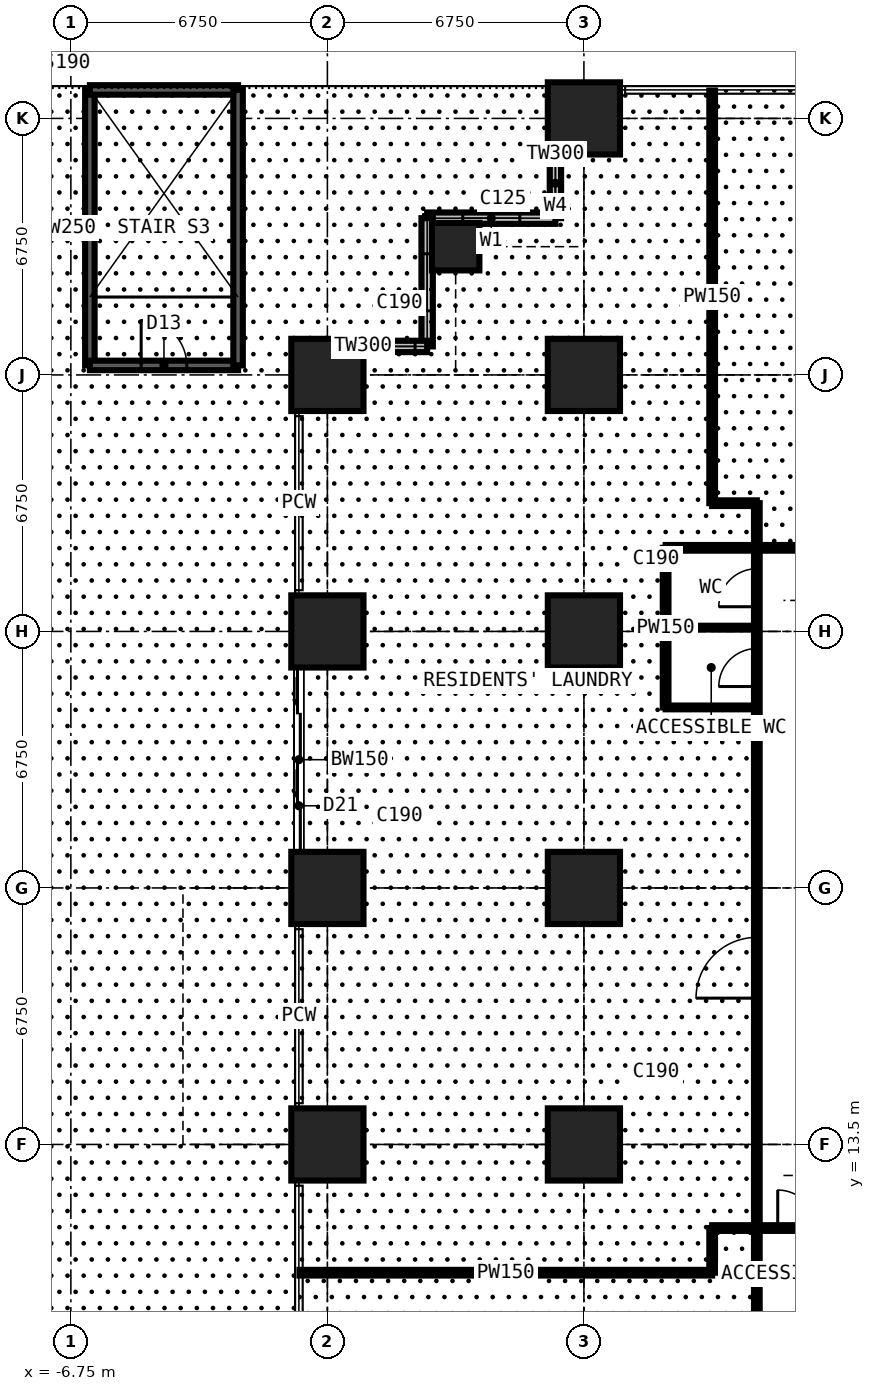
"""IFC4 building model, lengths in metres.
Left out: names, types, materials, properties, quantities, classifications, styles, units other than length and angle.
Written with IfcOpenShell. Run it as: python <this file> out.ifc"""

import sys

from ifc_helpers import new_model, si_unit, direction, frame, frame_2d, origin, origin_2d, place, context, subcontext, project, spatial, rectangle, extrude, element, fill, save


model = new_model("IFC4")
c1 = context("Model", 3, precision=1e-05, world=origin(), true_north=direction((0.0, 1.0)))
c2 = subcontext(c1, "Body", "Model", "MODEL_VIEW")
j1 = project(units=[si_unit("LENGTHUNIT", "METRE"), si_unit("PLANEANGLEUNIT", "RADIAN")], contexts=[c1])
p1 = place(None, origin())
s1 = spatial("IfcSite", under=j1, at=p1, CompositionType="ELEMENT")
p2 = place(p1, origin())
s2 = spatial("IfcBuilding", under=s1, at=p2, CompositionType="ELEMENT")
p3 = place(p2, frame((0.0, 0.0, 13.5)))
s3 = spatial("IfcBuildingStorey", under=s2, at=p3, CompositionType="ELEMENT", Elevation=13.5)
for number, where, z_axis, x_axis in (
    (1, (0.0, 13.5, 0.0), (0.0, 0.0, 1.0), (1.0, 0.0, 0.0)),
    (2, (0.0, 20.25, 0.0), (0.0, 0.0, 1.0), (1.0, 0.0, 0.0)),
    (3, (0.0, 27.0, 0.0), (0.0, 0.0, 1.0), (1.0, 0.0, 0.0)),
    (4, (0.0, 33.75, 0.0), (0.0, 0.0, 1.0), (1.0, 0.0, 0.0)),
):
    element("IfcColumn", number, at=place(p3, frame(where, z_axis=z_axis, x_axis=x_axis)), inside=s3, PredefinedType="COLUMN", context=c2, shape_type="SweptSolid", body=[
        extrude(rectangle(XDim=1.9, YDim=1.9, at=origin_2d()), origin(), (0.0, 0.0, 1.0), 4.5),
    ])
p4 = place(p3, frame((3.375, 37.125, 0.0), z_axis=(0.0, 0.0, 1.0), x_axis=(1.0, 0.0, 0.0)))
e5 = element("IfcColumn", 5, at=p4, inside=s3, PredefinedType="COLUMN", context=c2, shape_type="SweptSolid", body=[
    extrude(rectangle(XDim=1.25, YDim=1.25, at=origin_2d()), origin(), (0.0, 0.0, 1.0), 4.5),
])
for number, where, z_axis, x_axis in (
    (6, (6.75, 13.5, 0.0), (0.0, 0.0, 1.0), (1.0, 0.0, 0.0)),
    (7, (6.75, 20.25, 0.0), (0.0, 0.0, 1.0), (1.0, 0.0, 0.0)),
    (8, (6.75, 27.0, 0.0), (0.0, 0.0, 1.0), (1.0, 0.0, 0.0)),
    (9, (6.75, 33.75, 0.0), (0.0, 0.0, 1.0), (1.0, 0.0, 0.0)),
    (10, (6.75, 40.5, 0.0), (0.0, 0.0, 1.0), (1.0, 0.0, 0.0)),
):
    element("IfcColumn", number, at=place(p3, frame(where, z_axis=z_axis, x_axis=x_axis)), inside=s3, PredefinedType="COLUMN", context=c2, shape_type="SweptSolid", body=[
        extrude(rectangle(XDim=1.9, YDim=1.9, at=origin_2d()), origin(), (0.0, 0.0, 1.0), 4.5),
    ])
p5 = place(p3, frame((6.0, 41.25, 0.0), z_axis=(0.0, 0.0, 1.0), x_axis=(0.0, -1.0, 0.0)))
e11 = element("IfcWall", 11, at=p5, inside=s3, PredefinedType="SOLIDWALL", context=c2, shape_type="SweptSolid", body=[
    extrude(rectangle(XDim=3.375, YDim=0.3, at=frame_2d((1.688, 0.0))), origin(), (0.0, 0.0, 1.0), 4.275),
])
p6 = place(p5, frame((1.857, 0.0, 0.9)))
e12 = element("IfcOpeningElement", 12, at=p6, cuts=e11, PredefinedType="OPENING", context=c2, shape_type="SweptSolid", body=[
    extrude(rectangle(XDim=1.2, YDim=1.8, at=frame_2d((0.6, 0.9))), frame((0.0, 0.16, 0.0), z_axis=(0.0, -1.0, 0.0), x_axis=(1.0, 0.0, 0.0)), (0.0, 0.0, 1.0), 0.32),
])
p7 = place(p3, frame((6.0, 37.875, 0.0), z_axis=(0.0, 0.0, 1.0), x_axis=(-1.0, 0.0, 0.0)))
e13 = element("IfcWall", 13, at=p7, inside=s3, PredefinedType="SOLIDWALL", context=c2, shape_type="SweptSolid", body=[
    extrude(rectangle(XDim=3.375, YDim=0.3, at=frame_2d((1.688, 0.0))), origin(), (0.0, 0.0, 1.0), 4.275),
])
p8 = place(p7, frame((0.938, 0.0, 0.9)))
e14 = element("IfcOpeningElement", 14, at=p8, cuts=e13, PredefinedType="OPENING", context=c2, shape_type="SweptSolid", body=[
    extrude(rectangle(XDim=1.5, YDim=1.8, at=frame_2d((0.75, 0.9))), frame((0.0, 0.16, 0.0), z_axis=(0.0, -1.0, 0.0), x_axis=(1.0, 0.0, 0.0)), (0.0, 0.0, 1.0), 0.32),
])
p9 = place(p3, frame((2.625, 37.875, 0.0), z_axis=(0.0, 0.0, 1.0), x_axis=(0.0, -1.0, 0.0)))
e15 = element("IfcWall", 15, at=p9, inside=s3, PredefinedType="SOLIDWALL", context=c2, shape_type="SweptSolid", body=[
    extrude(rectangle(XDim=3.375, YDim=0.3, at=frame_2d((1.688, 0.0))), origin(), (0.0, 0.0, 1.0), 4.275),
])
p10 = place(p9, frame((0.938, 0.0, 0.9)))
e16 = element("IfcOpeningElement", 16, at=p10, cuts=e15, PredefinedType="OPENING", context=c2, shape_type="SweptSolid", body=[
    extrude(rectangle(XDim=1.5, YDim=1.8, at=frame_2d((0.75, 0.9))), frame((0.0, 0.16, 0.0), z_axis=(0.0, -1.0, 0.0), x_axis=(1.0, 0.0, 0.0)), (0.0, 0.0, 1.0), 0.32),
])
p11 = place(p3, frame((2.625, 34.5, 0.0), z_axis=(0.0, 0.0, 1.0), x_axis=(-1.0, 0.0, 0.0)))
e17 = element("IfcWall", 17, at=p11, inside=s3, PredefinedType="SOLIDWALL", context=c2, shape_type="SweptSolid", body=[
    extrude(rectangle(XDim=3.375, YDim=0.3, at=frame_2d((1.688, 0.0))), origin(), (0.0, 0.0, 1.0), 4.275),
])
p12 = place(p11, frame((0.317, 0.0, 0.9)))
e18 = element("IfcOpeningElement", 18, at=p12, cuts=e17, PredefinedType="OPENING", context=c2, shape_type="SweptSolid", body=[
    extrude(rectangle(XDim=1.2, YDim=1.8, at=frame_2d((0.6, 0.9))), frame((0.0, 0.16, 0.0), z_axis=(0.0, -1.0, 0.0), x_axis=(1.0, 0.0, 0.0)), (0.0, 0.0, 1.0), 0.32),
])
p13 = place(p3, frame((-0.75, 20.25, 0.0), z_axis=(0.0, 0.0, 1.0), x_axis=(0.0, 1.0, 0.0)))
e19 = element("IfcWall", 19, at=p13, inside=s3, PredefinedType="SOLIDWALL", context=c2, shape_type="SweptSolid", body=[
    extrude(rectangle(XDim=6.75, YDim=0.15, at=frame_2d((3.375, 0.0))), origin(), (0.0, 0.0, 1.0), 4.275),
])
p14 = place(p13, frame((0.962, 0.0, 0.0)))
e20 = element("IfcOpeningElement", 20, at=p14, cuts=e19, PredefinedType="OPENING", context=c2, shape_type="SweptSolid", body=[
    extrude(rectangle(XDim=2.4, YDim=2.4, at=frame_2d((1.2, 1.2))), frame((0.0, 0.085, 0.0), z_axis=(0.0, -1.0, 0.0), x_axis=(1.0, 0.0, 0.0)), (0.0, 0.0, 1.0), 0.17),
])
p15 = place(p13, frame((3.387, 0.0, 0.0)))
e21 = element("IfcOpeningElement", 21, at=p15, cuts=e19, PredefinedType="OPENING", context=c2, shape_type="SweptSolid", body=[
    extrude(rectangle(XDim=2.4, YDim=2.4, at=frame_2d((1.2, 1.2))), frame((0.0, 0.085, 0.0), z_axis=(0.0, -1.0, 0.0), x_axis=(1.0, 0.0, 0.0)), (0.0, 0.0, 1.0), 0.17),
])
p16 = place(p3, frame((-6.25, 34.0, -0.06), z_axis=(0.0, 0.0, 1.0), x_axis=(0.0, 1.0, 0.0)))
e22 = element("IfcWall", 22, at=p16, inside=s3, PredefinedType="SOLIDWALL", context=c2, shape_type="SweptSolid", body=[
    extrude(rectangle(XDim=7.25, YDim=0.25, at=frame_2d((3.625, 0.0))), origin(), (0.0, 0.0, 1.0), 4.335),
])
p17 = place(p3, frame((-6.25, 34.0, -0.06), z_axis=(0.0, 0.0, 1.0), x_axis=(1.0, 0.0, 0.0)))
e23 = element("IfcWall", 23, at=p17, inside=s3, PredefinedType="SOLIDWALL", context=c2, shape_type="SweptSolid", body=[
    extrude(rectangle(XDim=3.9, YDim=0.25, at=frame_2d((1.95, 0.0))), origin(), (0.0, 0.0, 1.0), 4.335),
])
p18 = place(p17, frame((1.35, 0.0, 0.0)))
e24 = element("IfcOpeningElement", 24, at=p18, cuts=e23, PredefinedType="OPENING", context=c2, shape_type="SweptSolid", body=[
    extrude(rectangle(XDim=1.2, YDim=2.2, at=frame_2d((0.6, 1.1))), frame((0.0, 0.135, 0.0), z_axis=(0.0, -1.0, 0.0), x_axis=(1.0, 0.0, 0.0)), (0.0, 0.0, 1.0), 0.27),
])
p19 = place(p3, frame((-6.25, 41.25, -0.06), z_axis=(0.0, 0.0, 1.0), x_axis=(1.0, 0.0, 0.0)))
e25 = element("IfcWall", 25, at=p19, inside=s3, PredefinedType="SOLIDWALL", context=c2, shape_type="SweptSolid", body=[
    extrude(rectangle(XDim=3.9, YDim=0.25, at=frame_2d((1.95, 0.0))), origin(), (0.0, 0.0, 1.0), 4.335),
])
p20 = place(p3, frame((-2.35, 34.0, -0.06), z_axis=(0.0, 0.0, 1.0), x_axis=(0.0, 1.0, 0.0)))
e26 = element("IfcWall", 26, at=p20, inside=s3, PredefinedType="SOLIDWALL", context=c2, shape_type="SweptSolid", body=[
    extrude(rectangle(XDim=7.25, YDim=0.25, at=frame_2d((3.625, 0.0))), origin(), (0.0, 0.0, 1.0), 4.335),
])
p21 = place(p3, frame((-0.734, 10.125, 0.0), z_axis=(0.0, 0.0, 1.0), x_axis=(1.0, 0.0, 0.0)))
e27 = element("IfcWall", 27, at=p21, inside=s3, PredefinedType="PARTITIONING", context=c2, shape_type="SweptSolid", body=[
    extrude(rectangle(XDim=10.859, YDim=0.15, at=frame_2d((5.429, 0.0))), origin(), (0.0, 0.0, 1.0), 4.275),
])
p22 = place(p3, frame((8.9, 25.0, 0.0), z_axis=(0.0, 0.0, 1.0), x_axis=(0.0, 1.0, 0.0)))
e28 = element("IfcWall", 28, at=p22, inside=s3, PredefinedType="PARTITIONING", context=c2, shape_type="SweptSolid", body=[
    extrude(rectangle(XDim=4.2, YDim=0.15, at=frame_2d((2.1, 0.0))), origin(), (0.0, 0.0, 1.0), 4.275),
])
p23 = place(p3, frame((8.9, 25.0, 0.0), z_axis=(0.0, 0.0, 1.0), x_axis=(1.0, 0.0, 0.0)))
e29 = element("IfcWall", 29, at=p23, inside=s3, PredefinedType="PARTITIONING", context=c2, shape_type="SweptSolid", body=[
    extrude(rectangle(XDim=2.4, YDim=0.1, at=frame_2d((1.2, 0.0))), origin(), (0.0, 0.0, 1.0), 4.275),
])
p24 = place(p3, frame((8.9, 27.1, 0.0), z_axis=(0.0, 0.0, 1.0), x_axis=(1.0, 0.0, 0.0)))
e30 = element("IfcWall", 30, at=p24, inside=s3, PredefinedType="PARTITIONING", context=c2, shape_type="SweptSolid", body=[
    extrude(rectangle(XDim=2.4, YDim=0.1, at=frame_2d((1.2, 0.0))), origin(), (0.0, 0.0, 1.0), 3.777),
])
p25 = place(p3, frame((8.9, 29.2, 0.0), z_axis=(0.0, 0.0, 1.0), x_axis=(1.0, 0.0, 0.0)))
e31 = element("IfcWall", 31, at=p25, inside=s3, PredefinedType="PARTITIONING", context=c2, shape_type="SweptSolid", body=[
    extrude(rectangle(XDim=21.475, YDim=0.15, at=frame_2d((10.738, 0.0))), origin(), (0.0, 0.0, 1.0), 4.275),
])
p26 = place(p25, frame((16.65, 0.0, 0.0)))
e32 = element("IfcOpeningElement", 32, at=p26, cuts=e31, PredefinedType="OPENING", context=c2, shape_type="SweptSolid", body=[
    extrude(rectangle(XDim=1.0, YDim=2.2, at=frame_2d((0.5, 1.1))), frame((0.0, 0.085, 0.0), z_axis=(0.0, -1.0, 0.0), x_axis=(1.0, 0.0, 0.0)), (0.0, 0.0, 1.0), 0.17),
])
p27 = place(p25, frame((18.75, 0.0, 0.0)))
e33 = element("IfcOpeningElement", 33, at=p27, cuts=e31, PredefinedType="OPENING", context=c2, shape_type="SweptSolid", body=[
    extrude(rectangle(XDim=1.0, YDim=2.2, at=frame_2d((0.5, 1.1))), frame((0.0, 0.085, 0.0), z_axis=(0.0, -1.0, 0.0), x_axis=(1.0, 0.0, 0.0)), (0.0, 0.0, 1.0), 0.17),
])
p28 = place(p25, frame((8.45, 0.0, 0.0)))
e34 = element("IfcOpeningElement", 34, at=p28, cuts=e31, PredefinedType="OPENING", context=c2, shape_type="SweptSolid", body=[
    extrude(rectangle(XDim=1.6, YDim=2.4, at=frame_2d((0.8, 1.2))), frame((0.0, 0.085, 0.0), z_axis=(0.0, -1.0, 0.0), x_axis=(1.0, 0.0, 0.0)), (0.0, 0.0, 1.0), 0.17),
])
p29 = place(p3, frame((10.125, 10.125, 0.0), z_axis=(0.0, 0.0, 1.0), x_axis=(0.0, 1.0, 0.0)))
e35 = element("IfcWall", 35, at=p29, inside=s3, PredefinedType="PARTITIONING", context=c2, shape_type="SweptSolid", body=[
    extrude(rectangle(XDim=1.175, YDim=0.15, at=frame_2d((0.587, 0.0))), origin(), (0.0, 0.0, 1.0), 4.275),
])
p30 = place(p3, frame((10.125, 11.3, 0.0), z_axis=(0.0, 0.0, 1.0), x_axis=(1.0, 0.0, 0.0)))
e36 = element("IfcWall", 36, at=p30, inside=s3, PredefinedType="PARTITIONING", context=c2, shape_type="SweptSolid", body=[
    extrude(rectangle(XDim=20.675, YDim=0.15, at=frame_2d((10.337, 0.0))), origin(), (0.0, 0.0, 1.0), 4.275),
])
p31 = place(p30, frame((1.725, 0.0, 0.0)))
e37 = element("IfcOpeningElement", 37, at=p31, cuts=e36, PredefinedType="OPENING", context=c2, shape_type="SweptSolid", body=[
    extrude(rectangle(XDim=1.0, YDim=2.2, at=frame_2d((0.5, 1.1))), frame((0.0, 0.085, 0.0), z_axis=(0.0, -1.0, 0.0), x_axis=(1.0, 0.0, 0.0)), (0.0, 0.0, 1.0), 0.17),
])
p32 = place(p30, frame((3.825, 0.0, 0.0)))
e38 = element("IfcOpeningElement", 38, at=p32, cuts=e36, PredefinedType="OPENING", context=c2, shape_type="SweptSolid", body=[
    extrude(rectangle(XDim=1.0, YDim=2.2, at=frame_2d((0.5, 1.1))), frame((0.0, 0.085, 0.0), z_axis=(0.0, -1.0, 0.0), x_axis=(1.0, 0.0, 0.0)), (0.0, 0.0, 1.0), 0.17),
])
p33 = place(p30, frame((10.625, 0.0, 0.0)))
e39 = element("IfcOpeningElement", 39, at=p33, cuts=e36, PredefinedType="OPENING", context=c2, shape_type="SweptSolid", body=[
    extrude(rectangle(XDim=1.6, YDim=2.4, at=frame_2d((0.8, 1.2))), frame((0.0, 0.085, 0.0), z_axis=(0.0, -1.0, 0.0), x_axis=(1.0, 0.0, 0.0)), (0.0, 0.0, 1.0), 0.17),
])
p34 = place(p3, frame((10.125, 30.375, 0.0), z_axis=(0.0, 0.0, 1.0), x_axis=(0.0, 1.0, 0.0)))
e40 = element("IfcWall", 40, at=p34, inside=s3, PredefinedType="PARTITIONING", context=c2, shape_type="SweptSolid", body=[
    extrude(rectangle(XDim=10.859, YDim=0.15, at=frame_2d((5.429, 0.0))), origin(), (0.0, 0.0, 1.0), 4.275),
])
p35 = place(p3, frame((10.125, 30.375, 0.0), z_axis=(0.0, 0.0, 1.0), x_axis=(1.0, 0.0, 0.0)))
e41 = element("IfcWall", 41, at=p35, inside=s3, PredefinedType="PARTITIONING", context=c2, shape_type="SweptSolid", body=[
    extrude(rectangle(XDim=1.175, YDim=0.15, at=frame_2d((0.587, 0.0))), origin(), (0.0, 0.0, 1.0), 4.275),
])
p36 = place(p3, frame((11.3, 8.9, 0.0), z_axis=(0.0, 0.0, 1.0), x_axis=(0.0, 1.0, 0.0)))
e42 = element("IfcWall", 42, at=p36, inside=s3, PredefinedType="PARTITIONING", context=c2, shape_type="SweptSolid", body=[
    extrude(rectangle(XDim=21.475, YDim=0.15, at=frame_2d((10.738, 0.0))), origin(), (0.0, 0.0, 1.0), 4.275),
])
p37 = place(p36, frame((16.65, 0.0, 0.0)))
e43 = element("IfcOpeningElement", 43, at=p37, cuts=e42, PredefinedType="OPENING", context=c2, shape_type="SweptSolid", body=[
    extrude(rectangle(XDim=1.0, YDim=2.2, at=frame_2d((0.5, 1.1))), frame((0.0, 0.085, 0.0), z_axis=(0.0, -1.0, 0.0), x_axis=(1.0, 0.0, 0.0)), (0.0, 0.0, 1.0), 0.17),
])
p38 = place(p36, frame((18.75, 0.0, 0.0)))
e44 = element("IfcOpeningElement", 44, at=p38, cuts=e42, PredefinedType="OPENING", context=c2, shape_type="SweptSolid", body=[
    extrude(rectangle(XDim=1.0, YDim=2.2, at=frame_2d((0.5, 1.1))), frame((0.0, 0.085, 0.0), z_axis=(0.0, -1.0, 0.0), x_axis=(1.0, 0.0, 0.0)), (0.0, 0.0, 1.0), 0.17),
])
p39 = place(p36, frame((8.45, 0.0, 0.0)))
e45 = element("IfcOpeningElement", 45, at=p39, cuts=e42, PredefinedType="OPENING", context=c2, shape_type="SweptSolid", body=[
    extrude(rectangle(XDim=1.6, YDim=2.4, at=frame_2d((0.8, 1.2))), frame((0.0, 0.085, 0.0), z_axis=(0.0, -1.0, 0.0), x_axis=(1.0, 0.0, 0.0)), (0.0, 0.0, 1.0), 0.17),
])
p40 = place(p6, origin())
e46 = element("IfcWindow", 46, at=p40, inside=s3, PartitioningType="SINGLE_PANEL", PredefinedType="WINDOW", context=c2, shape_type="SweptSolid", body=[
    extrude(rectangle(XDim=1.2, YDim=1.8, at=frame_2d((0.6, 0.9))), frame((0.0, 0.03, 0.0), z_axis=(0.0, -1.0, 0.0), x_axis=(1.0, 0.0, 0.0)), (0.0, 0.0, 1.0), 0.06),
])
fill(e12, e46)
p41 = place(p8, origin())
e47 = element("IfcWindow", 47, at=p41, inside=s3, PartitioningType="SINGLE_PANEL", PredefinedType="WINDOW", context=c2, shape_type="SweptSolid", body=[
    extrude(rectangle(XDim=1.5, YDim=1.8, at=frame_2d((0.75, 0.9))), frame((0.0, 0.03, 0.0), z_axis=(0.0, -1.0, 0.0), x_axis=(1.0, 0.0, 0.0)), (0.0, 0.0, 1.0), 0.06),
])
fill(e14, e47)
p42 = place(p10, origin())
e48 = element("IfcWindow", 48, at=p42, inside=s3, PartitioningType="SINGLE_PANEL", PredefinedType="WINDOW", context=c2, shape_type="SweptSolid", body=[
    extrude(rectangle(XDim=1.5, YDim=1.8, at=frame_2d((0.75, 0.9))), frame((0.0, 0.03, 0.0), z_axis=(0.0, -1.0, 0.0), x_axis=(1.0, 0.0, 0.0)), (0.0, 0.0, 1.0), 0.06),
])
fill(e16, e48)
p43 = place(p12, origin())
e49 = element("IfcWindow", 49, at=p43, inside=s3, PartitioningType="SINGLE_PANEL", PredefinedType="WINDOW", context=c2, shape_type="SweptSolid", body=[
    extrude(rectangle(XDim=1.2, YDim=1.8, at=frame_2d((0.6, 0.9))), frame((0.0, 0.03, 0.0), z_axis=(0.0, -1.0, 0.0), x_axis=(1.0, 0.0, 0.0)), (0.0, 0.0, 1.0), 0.06),
])
fill(e18, e49)
p44 = place(p14, origin())
e50 = element("IfcDoor", 50, at=p44, inside=s3, OperationType="SLIDING_TO_LEFT", PredefinedType="DOOR", context=c2, shape_type="SweptSolid", body=[
    extrude(rectangle(XDim=2.4, YDim=2.4, at=frame_2d((1.2, 1.2))), frame((0.0, 0.025, 0.0), z_axis=(0.0, -1.0, 0.0), x_axis=(1.0, 0.0, 0.0)), (0.0, 0.0, 1.0), 0.05),
])
fill(e20, e50)
p45 = place(p15, origin())
e51 = element("IfcDoor", 51, at=p45, inside=s3, OperationType="SLIDING_TO_LEFT", PredefinedType="DOOR", context=c2, shape_type="SweptSolid", body=[
    extrude(rectangle(XDim=2.4, YDim=2.4, at=frame_2d((1.2, 1.2))), frame((0.0, 0.025, 0.0), z_axis=(0.0, -1.0, 0.0), x_axis=(1.0, 0.0, 0.0)), (0.0, 0.0, 1.0), 0.05),
])
fill(e21, e51)
p46 = place(p31, origin())
e52 = element("IfcDoor", 52, at=p46, inside=s3, OperationType="SINGLE_SWING_LEFT", PredefinedType="DOOR", context=c2, shape_type="SweptSolid", body=[
    extrude(rectangle(XDim=1.0, YDim=2.2, at=frame_2d((0.5, 1.1))), frame((0.0, 0.025, 0.0), z_axis=(0.0, -1.0, 0.0), x_axis=(1.0, 0.0, 0.0)), (0.0, 0.0, 1.0), 0.05),
])
fill(e37, e52)
p47 = place(p37, origin())
e53 = element("IfcDoor", 53, at=p47, inside=s3, OperationType="SINGLE_SWING_LEFT", PredefinedType="DOOR", context=c2, shape_type="SweptSolid", body=[
    extrude(rectangle(XDim=1.0, YDim=2.2, at=frame_2d((0.5, 1.1))), frame((0.0, 0.025, 0.0), z_axis=(0.0, -1.0, 0.0), x_axis=(1.0, 0.0, 0.0)), (0.0, 0.0, 1.0), 0.05),
])
fill(e43, e53)
p48 = place(p38, origin())
e54 = element("IfcDoor", 54, at=p48, inside=s3, OperationType="SINGLE_SWING_LEFT", PredefinedType="DOOR", context=c2, shape_type="SweptSolid", body=[
    extrude(rectangle(XDim=1.0, YDim=2.2, at=frame_2d((0.5, 1.1))), frame((0.0, 0.025, 0.0), z_axis=(0.0, -1.0, 0.0), x_axis=(1.0, 0.0, 0.0)), (0.0, 0.0, 1.0), 0.05),
])
fill(e44, e54)
p49 = place(p39, origin())
e55 = element("IfcDoor", 55, at=p49, inside=s3, OperationType="DOUBLE_DOOR_SINGLE_SWING", PredefinedType="DOOR", context=c2, shape_type="SweptSolid", body=[
    extrude(rectangle(XDim=1.6, YDim=2.4, at=frame_2d((0.8, 1.2))), frame((0.0, 0.025, 0.0), z_axis=(0.0, -1.0, 0.0), x_axis=(1.0, 0.0, 0.0)), (0.0, 0.0, 1.0), 0.05),
])
fill(e45, e55)
p50 = place(p18, origin())
e56 = element("IfcDoor", 56, at=p50, inside=s3, OperationType="SINGLE_SWING_LEFT", PredefinedType="DOOR", context=c2, shape_type="SweptSolid", body=[
    extrude(rectangle(XDim=1.2, YDim=2.2, at=frame_2d((0.6, 1.1))), frame((0.0, 0.025, 0.0), z_axis=(0.0, -1.0, 0.0), x_axis=(1.0, 0.0, 0.0)), (0.0, 0.0, 1.0), 0.05),
])
fill(e24, e56)
save(model, sys.argv[1])
